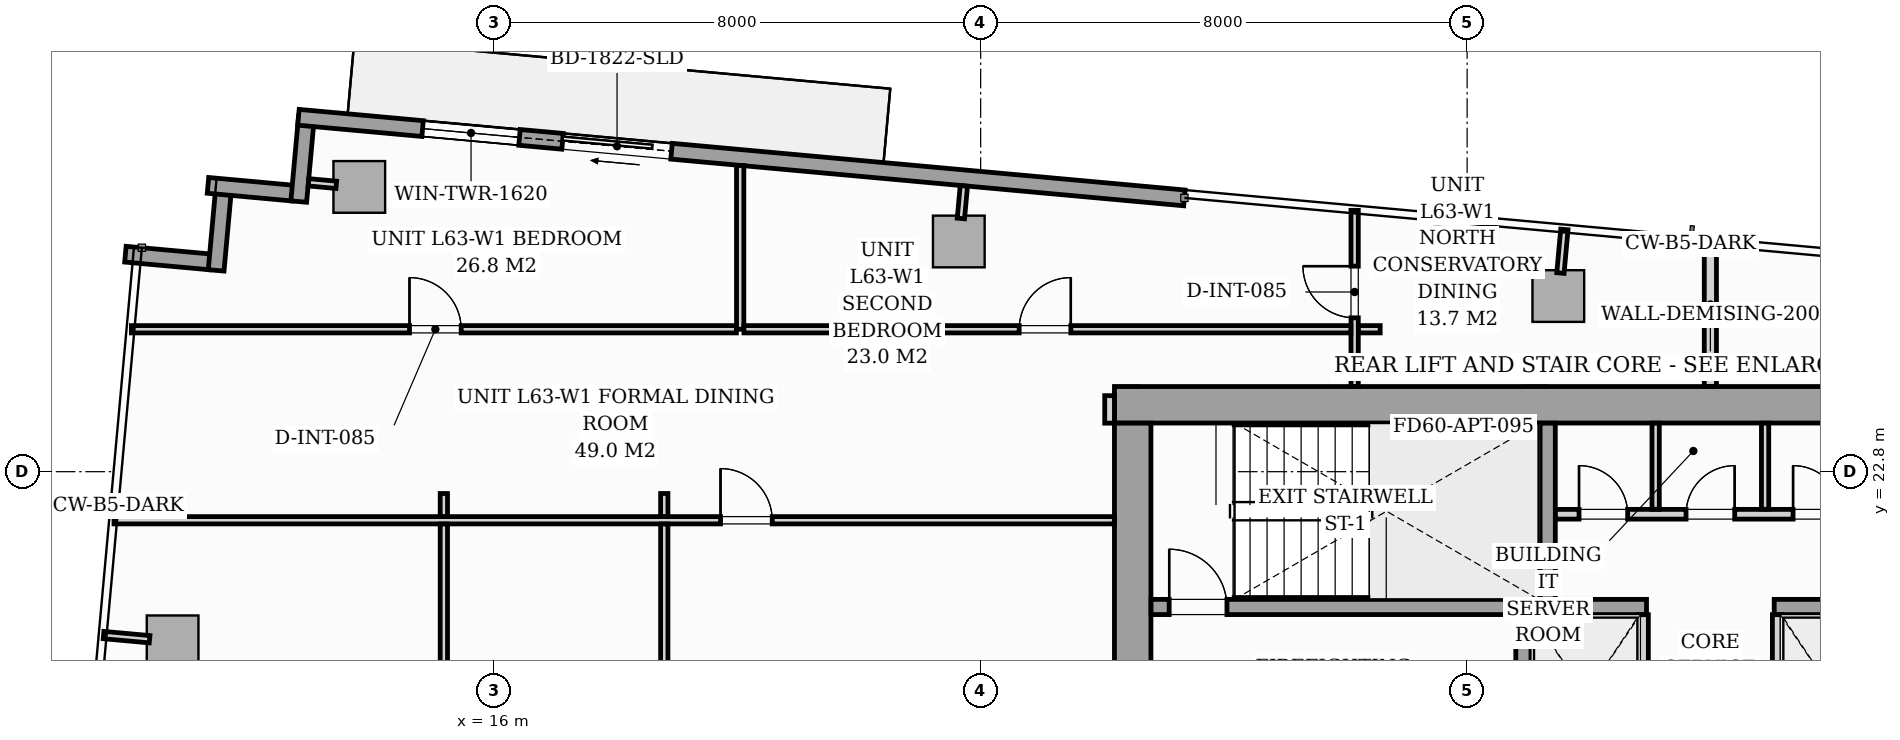
"""IFC4 building model, lengths in metres.
Left out: names, types, materials, properties, quantities, classifications, styles, units other than length and angle.
Written with IfcOpenShell. Run it as: python <this file> out.ifc"""

import sys

from ifc_helpers import new_model, si_unit, direction, frame, frame_2d, origin, origin_2d, place, context, subcontext, project, spatial, rectangle, i_section, extrude, source, transform, mapped, element, fill, save


model = new_model("IFC4")
c1 = context("Model", 3, precision=1e-05, world=origin(), true_north=direction((0.0, 1.0)))
c2 = subcontext(c1, "Body", "Model", "MODEL_VIEW")
j1 = project(units=[si_unit("LENGTHUNIT", "METRE"), si_unit("PLANEANGLEUNIT", "RADIAN")], contexts=[c1])
p1 = place(None, origin())
s1 = spatial("IfcSite", under=j1, at=p1, CompositionType="ELEMENT")
p2 = place(p1, origin())
s2 = spatial("IfcBuilding", under=s1, at=p2, CompositionType="ELEMENT")
p3 = place(p2, frame((0.0, 0.0, 219.9)))
s3 = spatial("IfcBuildingStorey", under=s2, at=p3, CompositionType="ELEMENT", Elevation=219.9)
m1 = source(origin(), c2, "Body", "SweptSolid", [
    extrude(i_section(OverallWidth=0.409, OverallDepth=0.425, WebThickness=0.033, FlangeThickness=0.052, FilletRadius=0.018, at=origin_2d()), origin(), (0.0, 0.0, 1.0), 3.296),
])
for number, where, z_axis, x_axis in (
    (1, (26.4, 24.0, 0.002), (0.0, 0.0, 1.0), (1.0, 0.0, 0.0)),
    (2, (33.12, 24.0, 0.002), (0.0, 0.0, 1.0), (1.0, 0.0, 0.0)),
):
    element("IfcColumn", number, at=place(p3, frame(where, z_axis=z_axis, x_axis=x_axis)), inside=s3, PredefinedType="PILASTER", context=c2, shape_type="MappedRepresentation", body=[
        mapped(m1, transform((0.0, 0.0, 0.0), scale=1.0)),
    ])
m2 = source(origin(), c2, "Body", "SweptSolid", [
    extrude(rectangle(XDim=0.85, YDim=0.85, at=origin_2d()), origin(), (0.0, 0.0, 1.0), 3.296),
])
for number, where, z_axis, x_axis in (
    (3, (13.781, 27.483, 0.002), (0.0, 0.0, 1.0), (0.996, -0.091, 0.0)),
    (4, (23.64, 26.585, 0.002), (0.0, 0.0, 1.0), (0.996, -0.091, 0.0)),
    (5, (33.5, 25.688, 0.002), (0.0, 0.0, 1.0), (0.996, -0.091, 0.0)),
    (6, (10.711, 20.01, 0.002), (0.0, 0.0, 1.0), (0.996, -0.091, 0.0)),
):
    element("IfcColumn", number, at=place(p3, frame(where, z_axis=z_axis, x_axis=x_axis)), inside=s3, PredefinedType="COLUMN", context=c2, shape_type="MappedRepresentation", body=[
        mapped(m2, transform((0.0, 0.0, 0.0), scale=1.0)),
    ])
for number, where, z_axis, x_axis in (
    (7, (9.935, 26.377, 0.0), (0.0, 0.0, 1.0), (0.996, -0.091, 0.0)),
    (8, (11.427, 26.111, 0.0), (0.0, 0.0, 1.0), (0.091, 0.996, 0.0)),
):
    element("IfcWall", number, at=place(p3, frame(where, z_axis=z_axis, x_axis=x_axis)), inside=s3, PredefinedType="STANDARD", context=c2, shape_type="SweptSolid", body=[
        extrude(rectangle(XDim=1.395, YDim=0.26, at=frame_2d((0.698, 0.0))), origin(), (0.0, 0.0, 1.0), 3.04),
    ])
p4 = place(p3, frame((11.293, 27.508, 0.0), z_axis=(0.0, 0.0, 1.0), x_axis=(0.995883159782, -0.090646191665, 0.0)))
e9 = element("IfcWall", 9, at=p4, inside=s3, PredefinedType="STANDARD", context=c2, shape_type="SweptSolid", body=[
    extrude(rectangle(XDim=1.395, YDim=0.26, at=frame_2d((0.698, 0.0))), origin(), (0.0, 0.0, 1.0), 3.04),
])
p5 = place(p3, frame((12.785, 27.242, 0.0), z_axis=(0.0, 0.0, 1.0), x_axis=(0.090472632758, 0.995898942023, 0.0)))
e10 = element("IfcWall", 10, at=p5, inside=s3, PredefinedType="STANDARD", context=c2, shape_type="SweptSolid", body=[
    extrude(rectangle(XDim=1.395, YDim=0.26, at=frame_2d((0.698, 0.0))), origin(), (0.0, 0.0, 1.0), 3.04),
])
p6 = place(p3, frame((12.781, 28.628, 0.0), z_axis=(0.0, 0.0, 1.0), x_axis=(0.995884584572, -0.090630536861, 0.0)))
e11 = element("IfcWall", 11, at=p6, inside=s3, PredefinedType="STANDARD", context=c2, shape_type="SweptSolid", body=[
    extrude(rectangle(XDim=14.63, YDim=0.26, at=frame_2d((7.315, 0.0))), origin(), (0.0, 0.0, 1.0), 3.04),
])
p7 = place(p6, frame((4.361, 0.0, 0.0)))
e12 = element("IfcOpeningElement", 12, at=p7, cuts=e11, PredefinedType="OPENING", context=c2, shape_type="SweptSolid", body=[
    extrude(rectangle(XDim=1.8, YDim=2.06, at=frame_2d((0.9, 1.03))), frame((0.0, 0.14, 0.0), z_axis=(0.0, -1.0, 0.0), x_axis=(1.0, 0.0, 0.0)), (0.0, 0.0, 1.0), 0.28),
])
p8 = place(p6, frame((2.05, 0.0, 0.65)))
e13 = element("IfcOpeningElement", 13, at=p8, cuts=e11, PredefinedType="OPENING", context=c2, shape_type="SweptSolid", body=[
    extrude(rectangle(XDim=1.6, YDim=1.5, at=frame_2d((0.8, 0.75))), frame((0.0, 0.14, 0.0), z_axis=(0.0, -1.0, 0.0), x_axis=(1.0, 0.0, 0.0)), (0.0, 0.0, 1.0), 0.28),
])
p9 = place(p3, frame((26.2, 23.9, 0.0), z_axis=(0.0, 0.0, 1.0), x_axis=(1.0, 0.0, 0.0)))
e14 = element("IfcWall", 14, at=p9, inside=s3, PredefinedType="SHEAR", context=c2, shape_type="SweptSolid", body=[
    extrude(rectangle(XDim=19.6, YDim=0.6, at=frame_2d((9.8, 0.0))), origin(), (0.0, 0.0, 1.0), 3.3),
])
p10 = place(p3, frame((26.5, 17.802, 0.0), z_axis=(0.0, 0.0, 1.0), x_axis=(0.0, 1.0, 0.0)))
e15 = element("IfcWall", 15, at=p10, inside=s3, PredefinedType="SHEAR", context=c2, shape_type="SweptSolid", body=[
    extrude(rectangle(XDim=5.796, YDim=0.6, at=frame_2d((2.898, 0.0))), origin(), (0.0, 0.0, 1.0), 3.3),
])
p11 = place(p3, frame((26.802, 20.575, 0.0), z_axis=(0.0, 0.0, 1.0), x_axis=(1.0, 0.0, 0.0)))
e16 = element("IfcWall", 16, at=p11, inside=s3, PredefinedType="SOLIDWALL", context=c2, shape_type="SweptSolid", body=[
    extrude(rectangle(XDim=8.148, YDim=0.25, at=frame_2d((4.074, 0.0))), origin(), (0.0, 0.0, 1.0), 3.3),
])
p12 = place(p11, frame((0.298, 0.0, 0.0)))
e17 = element("IfcOpeningElement", 17, at=p12, cuts=e16, PredefinedType="OPENING", context=c2, shape_type="SweptSolid", body=[
    extrude(rectangle(XDim=0.95, YDim=2.06, at=frame_2d((0.475, 1.03))), frame((0.0, 0.135, 0.0), z_axis=(0.0, -1.0, 0.0), x_axis=(1.0, 0.0, 0.0)), (0.0, 0.0, 1.0), 0.27),
])
p13 = place(p3, frame((37.05, 20.575, 0.0), z_axis=(0.0, 0.0, 1.0), x_axis=(1.0, 0.0, 0.0)))
e18 = element("IfcWall", 18, at=p13, inside=s3, PredefinedType="SOLIDWALL", context=c2, shape_type="SweptSolid", body=[
    extrude(rectangle(XDim=8.148, YDim=0.25, at=frame_2d((4.074, 0.0))), origin(), (0.0, 0.0, 1.0), 3.3),
])
p14 = place(p13, frame((6.6, 0.0, 0.0)))
e19 = element("IfcOpeningElement", 19, at=p14, cuts=e18, PredefinedType="OPENING", context=c2, shape_type="SweptSolid", body=[
    extrude(rectangle(XDim=0.95, YDim=2.06, at=frame_2d((0.475, 1.03))), frame((0.0, 0.135, 0.0), z_axis=(0.0, -1.0, 0.0), x_axis=(1.0, 0.0, 0.0)), (0.0, 0.0, 1.0), 0.27),
])
p15 = place(p3, frame((33.325, 20.702, 0.0), z_axis=(0.0, 0.0, 1.0), x_axis=(0.0, 1.0, 0.0)))
e20 = element("IfcWall", 20, at=p15, inside=s3, PredefinedType="SOLIDWALL", context=c2, shape_type="SweptSolid", body=[
    extrude(rectangle(XDim=2.896, YDim=0.25, at=frame_2d((1.448, 0.0))), origin(), (0.0, 0.0, 1.0), 3.3),
])
p16 = place(p3, frame((32.925, 17.802, 0.0), z_axis=(0.0, 0.0, 1.0), x_axis=(0.0, 1.0, 0.0)))
e21 = element("IfcWall", 21, at=p16, inside=s3, PredefinedType="SOLIDWALL", context=c2, shape_type="SweptSolid", body=[
    extrude(rectangle(XDim=2.646, YDim=0.25, at=frame_2d((1.323, 0.0))), origin(), (0.0, 0.0, 1.0), 3.3),
])
p17 = place(p16, frame((0.548, 0.0, 0.0)))
e22 = element("IfcOpeningElement", 22, at=p17, cuts=e21, PredefinedType="OPENING", context=c2, shape_type="SweptSolid", body=[
    extrude(rectangle(XDim=1.1, YDim=2.08, at=frame_2d((0.55, 1.04))), frame((0.0, 0.135, 0.0), z_axis=(0.0, -1.0, 0.0), x_axis=(1.0, 0.0, 0.0)), (0.0, 0.0, 1.0), 0.27),
])
for number, where, z_axis, x_axis in (
    (23, (34.9, 17.802, 0.0), (0.0, 0.0, 1.0), (0.0, 1.0, 0.0)),
    (24, (37.1, 17.802, 0.0), (0.0, 0.0, 1.0), (0.0, 1.0, 0.0)),
):
    element("IfcWall", number, at=place(p3, frame(where, z_axis=z_axis, x_axis=x_axis)), inside=s3, PredefinedType="PARTITIONING", context=c2, shape_type="SweptSolid", body=[
        extrude(rectangle(XDim=2.646, YDim=0.16, at=frame_2d((1.323, 0.0))), origin(), (0.0, 0.0, 1.0), 3.04),
    ])
p18 = place(p3, frame((33.452, 22.1, 0.0), z_axis=(0.0, 0.0, 1.0), x_axis=(1.0, 0.0, 0.0)))
e25 = element("IfcWall", 25, at=p18, inside=s3, PredefinedType="PARTITIONING", context=c2, shape_type="SweptSolid", body=[
    extrude(rectangle(XDim=5.096, YDim=0.16, at=frame_2d((2.548, 0.0))), origin(), (0.0, 0.0, 1.0), 3.04),
])
p19 = place(p18, frame((0.388, 0.0, 0.0)))
e26 = element("IfcOpeningElement", 26, at=p19, cuts=e25, PredefinedType="OPENING", context=c2, shape_type="SweptSolid", body=[
    extrude(rectangle(XDim=0.8, YDim=2.05, at=frame_2d((0.4, 1.025))), frame((0.0, 0.09, 0.0), z_axis=(0.0, -1.0, 0.0), x_axis=(1.0, 0.0, 0.0)), (0.0, 0.0, 1.0), 0.18),
])
p20 = place(p18, frame((2.148, 0.0, 0.0)))
e27 = element("IfcOpeningElement", 27, at=p20, cuts=e25, PredefinedType="OPENING", context=c2, shape_type="SweptSolid", body=[
    extrude(rectangle(XDim=0.8, YDim=2.05, at=frame_2d((0.4, 1.025))), frame((0.0, 0.09, 0.0), z_axis=(0.0, -1.0, 0.0), x_axis=(1.0, 0.0, 0.0)), (0.0, 0.0, 1.0), 0.18),
])
p21 = place(p18, frame((3.908, 0.0, 0.0)))
e28 = element("IfcOpeningElement", 28, at=p21, cuts=e25, PredefinedType="OPENING", context=c2, shape_type="SweptSolid", body=[
    extrude(rectangle(XDim=0.8, YDim=2.05, at=frame_2d((0.4, 1.025))), frame((0.0, 0.09, 0.0), z_axis=(0.0, -1.0, 0.0), x_axis=(1.0, 0.0, 0.0)), (0.0, 0.0, 1.0), 0.18),
])
for number, where, z_axis, x_axis in (
    (29, (35.1, 22.182, 0.0), (0.0, 0.0, 1.0), (0.0, 1.0, 0.0)),
    (30, (36.9, 22.182, 0.0), (0.0, 0.0, 1.0), (0.0, 1.0, 0.0)),
):
    element("IfcWall", number, at=place(p3, frame(where, z_axis=z_axis, x_axis=x_axis)), inside=s3, PredefinedType="PARTITIONING", context=c2, shape_type="SweptSolid", body=[
        extrude(rectangle(XDim=1.416, YDim=0.12, at=frame_2d((0.708, 0.0))), origin(), (0.0, 0.0, 1.0), 3.04),
    ])
p22 = place(p3, frame((26.12, 23.598, 0.0), z_axis=(0.0, 0.0, 1.0), x_axis=(0.0, 1.0, 0.0)))
e31 = element("IfcWall", 31, at=p22, inside=s3, PredefinedType="PARTITIONING", context=c2, shape_type="SweptSolid", body=[
    extrude(rectangle(XDim=0.452, YDim=0.16, at=frame_2d((0.226, 0.0))), origin(), (0.0, 0.0, 1.0), 3.04),
])
p23 = place(p3, frame((36.0, 24.202, 0.0), z_axis=(0.0, 0.0, 1.0), x_axis=(0.0, 1.0, 0.0)))
e32 = element("IfcWall", 32, at=p23, inside=s3, PredefinedType="PARTITIONING", context=c2, shape_type="SweptSolid", body=[
    extrude(rectangle(XDim=2.363, YDim=0.2, at=frame_2d((1.182, 0.0))), origin(), (0.0, 0.0, 1.0), 3.04),
])
p24 = place(p3, frame((30.15, 24.202, 0.0), z_axis=(0.0, 0.0, 1.0), x_axis=(0.0, 1.0, 0.0)))
e33 = element("IfcWall", 33, at=p24, inside=s3, PredefinedType="PARTITIONING", context=c2, shape_type="SweptSolid", body=[
    extrude(rectangle(XDim=2.896, YDim=0.12, at=frame_2d((1.448, 0.0))), origin(), (0.0, 0.0, 1.0), 3.04),
])
p25 = place(p24, frame((1.128, 0.0, 0.0)))
e34 = element("IfcOpeningElement", 34, at=p25, cuts=e33, PredefinedType="OPENING", context=c2, shape_type="SweptSolid", body=[
    extrude(rectangle(XDim=0.85, YDim=2.05, at=frame_2d((0.425, 1.025))), frame((0.0, 0.07, 0.0), z_axis=(0.0, -1.0, 0.0), x_axis=(1.0, 0.0, 0.0)), (0.0, 0.0, 1.0), 0.14),
])
p26 = place(p3, frame((20.045, 25.142, 0.0), z_axis=(0.0, 0.0, 1.0), x_axis=(0.0, 1.0, 0.0)))
e35 = element("IfcWall", 35, at=p26, inside=s3, PredefinedType="PARTITIONING", context=c2, shape_type="SweptSolid", body=[
    extrude(rectangle(XDim=2.692, YDim=0.12, at=frame_2d((1.346, 0.0))), origin(), (0.0, 0.0, 1.0), 3.04),
])
p27 = place(p3, frame((10.034, 25.142, 0.0), z_axis=(0.0, 0.0, 1.0), x_axis=(1.0, 0.0, 0.0)))
e36 = element("IfcWall", 36, at=p27, inside=s3, PredefinedType="PARTITIONING", context=c2, shape_type="SweptSolid", body=[
    extrude(rectangle(XDim=9.949, YDim=0.12, at=frame_2d((4.975, 0.0))), origin(), (0.0, 0.0, 1.0), 3.04),
])
p28 = place(p27, frame((4.573, 0.0, 0.0)))
e37 = element("IfcOpeningElement", 37, at=p28, cuts=e36, PredefinedType="OPENING", context=c2, shape_type="SweptSolid", body=[
    extrude(rectangle(XDim=0.85, YDim=2.05, at=frame_2d((0.425, 1.025))), frame((0.0, 0.07, 0.0), z_axis=(0.0, -1.0, 0.0), x_axis=(1.0, 0.0, 0.0)), (0.0, 0.0, 1.0), 0.14),
])
p29 = place(p3, frame((20.107, 25.142, 0.0), z_axis=(0.0, 0.0, 1.0), x_axis=(1.0, 0.0, 0.0)))
e38 = element("IfcWall", 38, at=p29, inside=s3, PredefinedType="PARTITIONING", context=c2, shape_type="SweptSolid", body=[
    extrude(rectangle(XDim=9.981, YDim=0.12, at=frame_2d((4.99, 0.0))), origin(), (0.0, 0.0, 1.0), 3.04),
])
p30 = place(p29, frame((4.526, 0.0, 0.0)))
e39 = element("IfcOpeningElement", 39, at=p30, cuts=e38, PredefinedType="OPENING", context=c2, shape_type="SweptSolid", body=[
    extrude(rectangle(XDim=0.85, YDim=2.05, at=frame_2d((0.425, 1.025))), frame((0.0, 0.07, 0.0), z_axis=(0.0, -1.0, 0.0), x_axis=(1.0, 0.0, 0.0)), (0.0, 0.0, 1.0), 0.14),
])
p31 = place(p3, frame((30.212, 25.142, 0.0), z_axis=(0.0, 0.0, 1.0), x_axis=(1.0, 0.0, 0.0)))
e40 = element("IfcWall", 40, at=p31, inside=s3, PredefinedType="PARTITIONING", context=c2, shape_type="SweptSolid", body=[
    extrude(rectangle(XDim=0.358, YDim=0.12, at=frame_2d((0.179, 0.0))), origin(), (0.0, 0.0, 1.0), 3.04),
])
p32 = place(p3, frame((9.748, 22.001, 0.0), z_axis=(0.0, 0.0, 1.0), x_axis=(1.0, 0.0, 0.0)))
e41 = element("IfcWall", 41, at=p32, inside=s3, PredefinedType="PARTITIONING", context=c2, shape_type="SweptSolid", body=[
    extrude(rectangle(XDim=16.45, YDim=0.12, at=frame_2d((8.225, 0.0))), origin(), (0.0, 0.0, 1.0), 3.04),
])
p33 = place(p32, frame((9.974, 0.0, 0.0)))
e42 = element("IfcOpeningElement", 42, at=p33, cuts=e41, PredefinedType="OPENING", context=c2, shape_type="SweptSolid", body=[
    extrude(rectangle(XDim=0.85, YDim=2.05, at=frame_2d((0.425, 1.025))), frame((0.0, 0.07, 0.0), z_axis=(0.0, -1.0, 0.0), x_axis=(1.0, 0.0, 0.0)), (0.0, 0.0, 1.0), 0.14),
])
p34 = place(p3, frame((15.172, 11.858, 0.0), z_axis=(0.0, 0.0, 1.0), x_axis=(0.0, 1.0, 0.0)))
e43 = element("IfcWall", 43, at=p34, inside=s3, PredefinedType="PARTITIONING", context=c2, shape_type="SweptSolid", body=[
    extrude(rectangle(XDim=10.081, YDim=0.12, at=frame_2d((5.041, 0.0))), origin(), (0.0, 0.0, 1.0), 3.04),
])
p35 = place(p34, frame((4.615, 0.0, 0.0)))
e44 = element("IfcOpeningElement", 44, at=p35, cuts=e43, PredefinedType="OPENING", context=c2, shape_type="SweptSolid", body=[
    extrude(rectangle(XDim=0.85, YDim=2.05, at=frame_2d((0.425, 1.025))), frame((0.0, 0.07, 0.0), z_axis=(0.0, -1.0, 0.0), x_axis=(1.0, 0.0, 0.0)), (0.0, 0.0, 1.0), 0.14),
])
p36 = place(p3, frame((15.172, 22.063, 0.0), z_axis=(0.0, 0.0, 1.0), x_axis=(0.0, 1.0, 0.0)))
e45 = element("IfcWall", 45, at=p36, inside=s3, PredefinedType="PARTITIONING", context=c2, shape_type="SweptSolid", body=[
    extrude(rectangle(XDim=0.378, YDim=0.12, at=frame_2d((0.189, 0.0))), origin(), (0.0, 0.0, 1.0), 3.04),
])
p37 = place(p3, frame((18.797, 11.858, 0.0), z_axis=(0.0, 0.0, 1.0), x_axis=(0.0, 1.0, 0.0)))
e46 = element("IfcWall", 46, at=p37, inside=s3, PredefinedType="PARTITIONING", context=c2, shape_type="SweptSolid", body=[
    extrude(rectangle(XDim=10.081, YDim=0.12, at=frame_2d((5.041, 0.0))), origin(), (0.0, 0.0, 1.0), 3.04),
])
p38 = place(p37, frame((4.615, 0.0, 0.0)))
e47 = element("IfcOpeningElement", 47, at=p38, cuts=e46, PredefinedType="OPENING", context=c2, shape_type="SweptSolid", body=[
    extrude(rectangle(XDim=0.85, YDim=2.05, at=frame_2d((0.425, 1.025))), frame((0.0, 0.07, 0.0), z_axis=(0.0, -1.0, 0.0), x_axis=(1.0, 0.0, 0.0)), (0.0, 0.0, 1.0), 0.14),
])
p39 = place(p3, frame((18.797, 22.063, 0.0), z_axis=(0.0, 0.0, 1.0), x_axis=(0.0, 1.0, 0.0)))
e48 = element("IfcWall", 48, at=p39, inside=s3, PredefinedType="PARTITIONING", context=c2, shape_type="SweptSolid", body=[
    extrude(rectangle(XDim=0.378, YDim=0.12, at=frame_2d((0.189, 0.0))), origin(), (0.0, 0.0, 1.0), 3.04),
])
p40 = place(p3, frame((13.403, 27.517, 0.0), z_axis=(0.0, 0.0, 1.0), x_axis=(-0.995884462012, 0.090631883588, 0.0)))
e49 = element("IfcWall", 49, at=p40, inside=s3, PredefinedType="PARTITIONING", context=c2, shape_type="SweptSolid", body=[
    extrude(rectangle(XDim=0.458, YDim=0.12, at=frame_2d((0.229, 0.0))), origin(), (0.0, 0.0, 1.0), 3.04),
])
p41 = place(p3, frame((23.675, 26.964, 0.0), z_axis=(0.0, 0.0, 1.0), x_axis=(0.090740281653, 0.995874591144, 0.0)))
e50 = element("IfcWall", 50, at=p41, inside=s3, PredefinedType="PARTITIONING", context=c2, shape_type="SweptSolid", body=[
    extrude(rectangle(XDim=0.538, YDim=0.12, at=frame_2d((0.269, 0.0))), origin(), (0.0, 0.0, 1.0), 3.04),
])
p42 = place(p3, frame((33.534, 26.067, 0.0), z_axis=(0.0, 0.0, 1.0), x_axis=(0.090535746043, 0.995893206468, 0.0)))
e51 = element("IfcWall", 51, at=p42, inside=s3, PredefinedType="PARTITIONING", context=c2, shape_type="SweptSolid", body=[
    extrude(rectangle(XDim=0.72, YDim=0.12, at=frame_2d((0.36, 0.0))), origin(), (0.0, 0.0, 1.0), 3.04),
])
p43 = place(p3, frame((10.333, 20.045, 0.0), z_axis=(0.0, 0.0, 1.0), x_axis=(-0.995890573658, 0.09056470228, 0.0)))
e52 = element("IfcWall", 52, at=p43, inside=s3, PredefinedType="PARTITIONING", context=c2, shape_type="SweptSolid", body=[
    extrude(rectangle(XDim=0.76, YDim=0.12, at=frame_2d((0.38, 0.0))), origin(), (0.0, 0.0, 1.0), 3.04),
])
m3 = source(origin(), c2, "Body", "SweptSolid", [
    extrude(rectangle(XDim=1.8, YDim=2.06, at=frame_2d((0.9, 1.03))), frame((0.0, 0.025, 0.0), z_axis=(0.0, -1.0, 0.0), x_axis=(1.0, 0.0, 0.0)), (0.0, 0.0, 1.0), 0.05),
])
p44 = place(p7, origin())
e53 = element("IfcDoor", 53, at=p44, inside=s3, OperationType="SLIDING_TO_LEFT", PredefinedType="DOOR", context=c2, shape_type="MappedRepresentation", body=[
    mapped(m3, transform((0.0, 0.0, 0.0), scale=1.0)),
])
fill(e12, e53)
m4 = source(origin(), c2, "Body", "SweptSolid", [
    extrude(rectangle(XDim=1.6, YDim=1.5, at=frame_2d((0.8, 0.75))), frame((0.0, 0.03, 0.0), z_axis=(0.0, -1.0, 0.0), x_axis=(1.0, 0.0, 0.0)), (0.0, 0.0, 1.0), 0.06),
])
p45 = place(p8, origin())
e54 = element("IfcWindow", 54, at=p45, inside=s3, PartitioningType="SINGLE_PANEL", PredefinedType="WINDOW", context=c2, shape_type="MappedRepresentation", body=[
    mapped(m4, transform((0.0, 0.0, 0.0), scale=1.0)),
])
fill(e13, e54)
m5 = source(origin(), c2, "Body", "SweptSolid", [
    extrude(rectangle(XDim=0.95, YDim=2.06, at=frame_2d((0.475, 1.03))), frame((0.0, 0.025, 0.0), z_axis=(0.0, -1.0, 0.0), x_axis=(1.0, 0.0, 0.0)), (0.0, 0.0, 1.0), 0.05),
])
p46 = place(p12, origin())
e55 = element("IfcDoor", 55, at=p46, inside=s3, OperationType="SINGLE_SWING_LEFT", PredefinedType="DOOR", context=c2, shape_type="MappedRepresentation", body=[
    mapped(m5, transform((0.0, 0.0, 0.0), scale=1.0)),
])
fill(e17, e55)
m6 = source(origin(), c2, "Body", "SweptSolid", [
    extrude(rectangle(XDim=0.8, YDim=2.05, at=frame_2d((0.4, 1.025))), frame((0.0, 0.025, 0.0), z_axis=(0.0, -1.0, 0.0), x_axis=(1.0, 0.0, 0.0)), (0.0, 0.0, 1.0), 0.05),
])
p47 = place(p19, origin())
e56 = element("IfcDoor", 56, at=p47, inside=s3, OperationType="SINGLE_SWING_LEFT", PredefinedType="DOOR", context=c2, shape_type="MappedRepresentation", body=[
    mapped(m6, transform((0.0, 0.0, 0.0), scale=1.0)),
])
fill(e26, e56)
p48 = place(p20, origin())
e57 = element("IfcDoor", 57, at=p48, inside=s3, OperationType="SINGLE_SWING_RIGHT", PredefinedType="DOOR", context=c2, shape_type="MappedRepresentation", body=[
    mapped(m6, transform((0.0, 0.0, 0.0), scale=1.0)),
])
fill(e27, e57)
p49 = place(p21, origin())
e58 = element("IfcDoor", 58, at=p49, inside=s3, OperationType="SINGLE_SWING_LEFT", PredefinedType="DOOR", context=c2, shape_type="MappedRepresentation", body=[
    mapped(m6, transform((0.0, 0.0, 0.0), scale=1.0)),
])
fill(e28, e58)
m7 = source(origin(), c2, "Body", "SweptSolid", [
    extrude(rectangle(XDim=0.85, YDim=2.05, at=frame_2d((0.425, 1.025))), frame((0.0, 0.025, 0.0), z_axis=(0.0, -1.0, 0.0), x_axis=(1.0, 0.0, 0.0)), (0.0, 0.0, 1.0), 0.05),
])
p50 = place(p25, origin())
e59 = element("IfcDoor", 59, at=p50, inside=s3, OperationType="SINGLE_SWING_RIGHT", PredefinedType="DOOR", context=c2, shape_type="MappedRepresentation", body=[
    mapped(m7, transform((0.0, 0.0, 0.0), scale=1.0)),
])
fill(e34, e59)
p51 = place(p28, origin())
e60 = element("IfcDoor", 60, at=p51, inside=s3, OperationType="SINGLE_SWING_LEFT", PredefinedType="DOOR", context=c2, shape_type="MappedRepresentation", body=[
    mapped(m7, transform((0.0, 0.0, 0.0), scale=1.0)),
])
fill(e37, e60)
p52 = place(p30, origin())
e61 = element("IfcDoor", 61, at=p52, inside=s3, OperationType="SINGLE_SWING_RIGHT", PredefinedType="DOOR", context=c2, shape_type="MappedRepresentation", body=[
    mapped(m7, transform((0.0, 0.0, 0.0), scale=1.0)),
])
fill(e39, e61)
p53 = place(p33, origin())
e62 = element("IfcDoor", 62, at=p53, inside=s3, OperationType="SINGLE_SWING_LEFT", PredefinedType="DOOR", context=c2, shape_type="MappedRepresentation", body=[
    mapped(m7, transform((0.0, 0.0, 0.0), scale=1.0)),
])
fill(e42, e62)
save(model, sys.argv[1])
